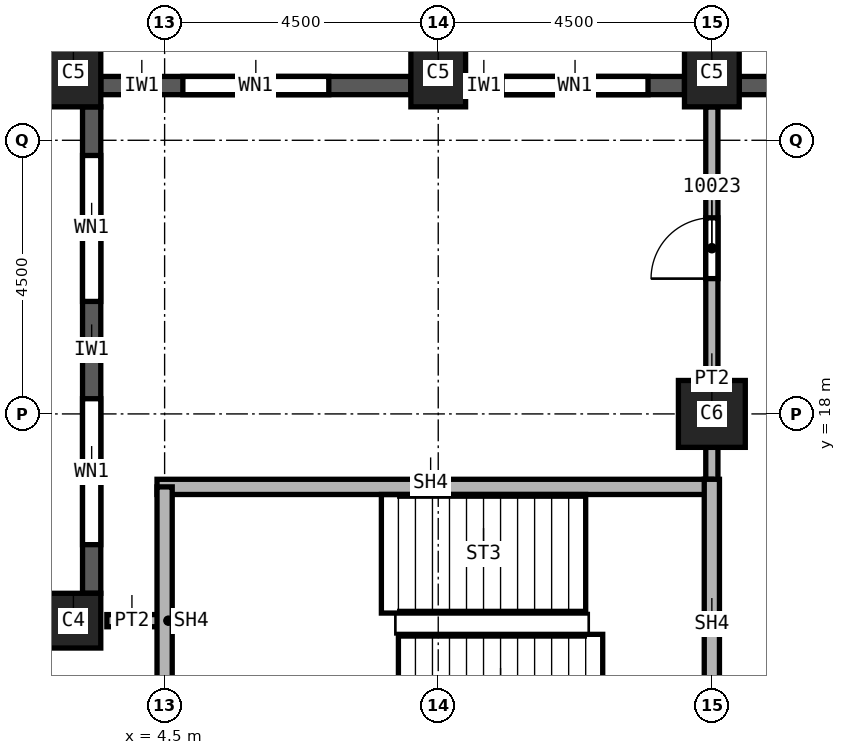
"""IFC4 building model, lengths in metres.
Left out: names, types, materials, properties, quantities, classifications, styles, units other than length and angle.
Written with IfcOpenShell. Run it as: python <this file> out.ifc"""

import sys

from ifc_helpers import new_model, si_unit, direction, frame, frame_2d, origin, origin_2d, place, context, subcontext, project, spatial, rectangle, extrude, element, fill, save


model = new_model("IFC4")
c1 = context("Model", 3, precision=1e-05, world=origin(), true_north=direction((0.0, 1.0)))
c2 = subcontext(c1, "Body", "Model", "MODEL_VIEW")
j1 = project(units=[si_unit("LENGTHUNIT", "METRE"), si_unit("PLANEANGLEUNIT", "RADIAN")], contexts=[c1])
p1 = place(None, origin())
s1 = spatial("IfcSite", under=j1, at=p1, CompositionType="ELEMENT")
p2 = place(p1, origin())
s2 = spatial("IfcBuilding", under=s1, at=p2, CompositionType="ELEMENT")
p3 = place(p2, frame((0.0, 0.0, 174.0)))
s3 = spatial("IfcBuildingStorey", under=s2, at=p3, CompositionType="ELEMENT", Elevation=174.0)
p4 = place(p3, frame((13.5, 18.0, 0.0), z_axis=(0.0, 0.0, 1.0), x_axis=(1.0, 0.0, 0.0)))
e1 = element("IfcColumn", 1, at=p4, inside=s3, PredefinedType="COLUMN", context=c2, shape_type="SweptSolid", body=[
    extrude(rectangle(XDim=1.1, YDim=1.1, at=origin_2d()), origin(), (0.0, 0.0, 1.0), 3.59),
])
for number, where, z_axis, x_axis in (
    (2, (3.0, 23.6, 0.0), (0.0, 0.0, 1.0), (1.0, 0.0, 0.0)),
    (3, (9.0, 23.6, 0.0), (0.0, 0.0, 1.0), (1.0, 0.0, 0.0)),
    (4, (13.5, 23.6, 0.0), (0.0, 0.0, 1.0), (1.0, 0.0, 0.0)),
):
    element("IfcColumn", number, at=place(p3, frame(where, z_axis=z_axis, x_axis=x_axis)), inside=s3, PredefinedType="COLUMN", context=c2, shape_type="SweptSolid", body=[
        extrude(rectangle(XDim=0.9, YDim=1.1, at=origin_2d()), origin(), (0.0, 0.0, 1.0), 3.59),
    ])
p5 = place(p3, frame((3.0, 14.6, 0.0), z_axis=(0.0, 0.0, 1.0), x_axis=(1.0, 0.0, 0.0)))
e5 = element("IfcColumn", 5, at=p5, inside=s3, PredefinedType="COLUMN", context=c2, shape_type="SweptSolid", body=[
    extrude(rectangle(XDim=0.9, YDim=0.9, at=origin_2d()), origin(), (0.0, 0.0, 1.0), 3.59),
])
p6 = place(p3, frame((17.55, 23.4, 0.0), z_axis=(0.0, 0.0, 1.0), x_axis=(-1.0, 0.0, 0.0)))
e6 = element("IfcWall", 6, at=p6, inside=s3, PredefinedType="SOLIDWALL", context=c2, shape_type="SweptSolid", body=[
    extrude(rectangle(XDim=3.6, YDim=0.3, at=frame_2d((1.8, 0.0))), origin(), (0.0, 0.0, 1.0), 2.99),
])
p7 = place(p6, frame((0.775, 0.0, 0.8)))
e7 = element("IfcOpeningElement", 7, at=p7, cuts=e6, PredefinedType="OPENING", context=c2, shape_type="SweptSolid", body=[
    extrude(rectangle(XDim=1.0, YDim=1.95, at=frame_2d((0.5, 0.975))), frame((0.0, 0.15, 0.0), z_axis=(0.0, -1.0, 0.0), x_axis=(1.0, 0.0, 0.0)), (0.0, 0.0, 1.0), 0.3),
])
p8 = place(p6, frame((2.375, 0.0, 0.8)))
e8 = element("IfcOpeningElement", 8, at=p8, cuts=e6, PredefinedType="OPENING", context=c2, shape_type="SweptSolid", body=[
    extrude(rectangle(XDim=0.6, YDim=1.95, at=frame_2d((0.3, 0.975))), frame((0.0, 0.15, 0.0), z_axis=(0.0, -1.0, 0.0), x_axis=(1.0, 0.0, 0.0)), (0.0, 0.0, 1.0), 0.3),
])
p9 = place(p3, frame((13.05, 23.4, 0.0), z_axis=(0.0, 0.0, 1.0), x_axis=(-1.0, 0.0, 0.0)))
e9 = element("IfcWall", 9, at=p9, inside=s3, PredefinedType="SOLIDWALL", context=c2, shape_type="SweptSolid", body=[
    extrude(rectangle(XDim=3.6, YDim=0.3, at=frame_2d((1.8, 0.0))), origin(), (0.0, 0.0, 1.0), 2.99),
])
p10 = place(p9, frame((0.6, 0.0, 0.8)))
e10 = element("IfcOpeningElement", 10, at=p10, cuts=e9, PredefinedType="OPENING", context=c2, shape_type="SweptSolid", body=[
    extrude(rectangle(XDim=2.4, YDim=1.95, at=frame_2d((1.2, 0.975))), frame((0.0, 0.15, 0.0), z_axis=(0.0, -1.0, 0.0), x_axis=(1.0, 0.0, 0.0)), (0.0, 0.0, 1.0), 0.3),
])
p11 = place(p3, frame((8.55, 23.4, 0.0), z_axis=(0.0, 0.0, 1.0), x_axis=(-1.0, 0.0, 0.0)))
e11 = element("IfcWall", 11, at=p11, inside=s3, PredefinedType="SOLIDWALL", context=c2, shape_type="SweptSolid", body=[
    extrude(rectangle(XDim=5.1, YDim=0.3, at=frame_2d((2.55, 0.0))), origin(), (0.0, 0.0, 1.0), 2.99),
])
p12 = place(p11, frame((1.35, 0.0, 0.8)))
e12 = element("IfcOpeningElement", 12, at=p12, cuts=e11, PredefinedType="OPENING", context=c2, shape_type="SweptSolid", body=[
    extrude(rectangle(XDim=2.4, YDim=1.95, at=frame_2d((1.2, 0.975))), frame((0.0, 0.15, 0.0), z_axis=(0.0, -1.0, 0.0), x_axis=(1.0, 0.0, 0.0)), (0.0, 0.0, 1.0), 0.3),
])
p13 = place(p3, frame((3.3, 23.05, 0.0), z_axis=(0.0, 0.0, 1.0), x_axis=(0.0, -1.0, 0.0)))
e13 = element("IfcWall", 13, at=p13, inside=s3, PredefinedType="SOLIDWALL", context=c2, shape_type="SweptSolid", body=[
    extrude(rectangle(XDim=8.0, YDim=0.3, at=frame_2d((4.0, 0.0))), origin(), (0.0, 0.0, 1.0), 2.99),
])
p14 = place(p13, frame((0.8, 0.0, 0.8)))
e14 = element("IfcOpeningElement", 14, at=p14, cuts=e13, PredefinedType="OPENING", context=c2, shape_type="SweptSolid", body=[
    extrude(rectangle(XDim=2.4, YDim=1.95, at=frame_2d((1.2, 0.975))), frame((0.0, 0.15, 0.0), z_axis=(0.0, -1.0, 0.0), x_axis=(1.0, 0.0, 0.0)), (0.0, 0.0, 1.0), 0.3),
])
p15 = place(p13, frame((4.8, 0.0, 0.8)))
e15 = element("IfcOpeningElement", 15, at=p15, cuts=e13, PredefinedType="OPENING", context=c2, shape_type="SweptSolid", body=[
    extrude(rectangle(XDim=2.4, YDim=1.95, at=frame_2d((1.2, 0.975))), frame((0.0, 0.15, 0.0), z_axis=(0.0, -1.0, 0.0), x_axis=(1.0, 0.0, 0.0)), (0.0, 0.0, 1.0), 0.3),
])
p16 = place(p3, frame((3.55, 14.6, 0.0), z_axis=(0.0, 0.0, 1.0), x_axis=(1.0, 0.0, 0.0)))
e16 = element("IfcWall", 16, at=p16, inside=s3, PredefinedType="PARTITIONING", context=c2, shape_type="SweptSolid", body=[
    extrude(rectangle(XDim=0.95, YDim=0.2, at=frame_2d((0.475, 0.0))), origin(), (0.0, 0.0, 1.0), 3.59),
])
p17 = place(p3, frame((13.5, 16.675, 0.0), z_axis=(0.0, 0.0, 1.0), x_axis=(0.0, 1.0, 0.0)))
e17 = element("IfcWall", 17, at=p17, inside=s3, PredefinedType="PARTITIONING", context=c2, shape_type="SweptSolid", body=[
    extrude(rectangle(XDim=6.375, YDim=0.2, at=frame_2d((3.188, 0.0))), origin(), (0.0, 0.0, 1.0), 3.59),
])
p18 = place(p17, frame((3.55, 0.0, 0.0)))
e18 = element("IfcOpeningElement", 18, at=p18, cuts=e17, PredefinedType="OPENING", context=c2, shape_type="SweptSolid", body=[
    extrude(rectangle(XDim=1.0, YDim=2.1, at=frame_2d((0.5, 1.05))), frame((0.0, 0.1, 0.0), z_axis=(0.0, -1.0, 0.0), x_axis=(1.0, 0.0, 0.0)), (0.0, 0.0, 1.0), 0.2),
])
p19 = place(p3, frame((4.375, 16.8, 0.0), z_axis=(0.0, 0.0, 1.0), x_axis=(1.0, 0.0, 0.0)))
e19 = element("IfcWall", 19, at=p19, inside=s3, PredefinedType="SOLIDWALL", context=c2, shape_type="SweptSolid", body=[
    extrude(rectangle(XDim=9.125, YDim=0.25, at=frame_2d((4.562, 0.0))), origin(), (0.0, 0.0, 1.0), 3.59),
])
p20 = place(p3, frame((4.5, 12.3, 0.0), z_axis=(0.0, 0.0, 1.0), x_axis=(0.0, 1.0, 0.0)))
e20 = element("IfcWall", 20, at=p20, inside=s3, PredefinedType="SOLIDWALL", context=c2, shape_type="SweptSolid", body=[
    extrude(rectangle(XDim=4.5, YDim=0.25, at=frame_2d((2.25, 0.0))), origin(), (0.0, 0.0, 1.0), 3.59),
])
p21 = place(p3, frame((13.5, 12.175, 0.0), z_axis=(0.0, 0.0, 1.0), x_axis=(0.0, 1.0, 0.0)))
e21 = element("IfcWall", 21, at=p21, inside=s3, PredefinedType="SOLIDWALL", context=c2, shape_type="SweptSolid", body=[
    extrude(rectangle(XDim=4.75, YDim=0.25, at=frame_2d((2.375, 0.0))), origin(), (0.0, 0.0, 1.0), 3.59),
])
p22 = place(p10, origin())
e22 = element("IfcWindow", 22, at=p22, inside=s3, PartitioningType="SINGLE_PANEL", PredefinedType="WINDOW", context=c2, shape_type="SweptSolid", body=[
    extrude(rectangle(XDim=2.4, YDim=1.95, at=frame_2d((1.2, 0.975))), frame((0.0, 0.03, 0.0), z_axis=(0.0, -1.0, 0.0), x_axis=(1.0, 0.0, 0.0)), (0.0, 0.0, 1.0), 0.06),
])
fill(e10, e22)
p23 = place(p12, origin())
e23 = element("IfcWindow", 23, at=p23, inside=s3, PartitioningType="SINGLE_PANEL", PredefinedType="WINDOW", context=c2, shape_type="SweptSolid", body=[
    extrude(rectangle(XDim=2.4, YDim=1.95, at=frame_2d((1.2, 0.975))), frame((0.0, 0.03, 0.0), z_axis=(0.0, -1.0, 0.0), x_axis=(1.0, 0.0, 0.0)), (0.0, 0.0, 1.0), 0.06),
])
fill(e12, e23)
p24 = place(p14, origin())
e24 = element("IfcWindow", 24, at=p24, inside=s3, PartitioningType="SINGLE_PANEL", PredefinedType="WINDOW", context=c2, shape_type="SweptSolid", body=[
    extrude(rectangle(XDim=2.4, YDim=1.95, at=frame_2d((1.2, 0.975))), frame((0.0, 0.03, 0.0), z_axis=(0.0, -1.0, 0.0), x_axis=(1.0, 0.0, 0.0)), (0.0, 0.0, 1.0), 0.06),
])
fill(e14, e24)
p25 = place(p15, origin())
e25 = element("IfcWindow", 25, at=p25, inside=s3, PartitioningType="SINGLE_PANEL", PredefinedType="WINDOW", context=c2, shape_type="SweptSolid", body=[
    extrude(rectangle(XDim=2.4, YDim=1.95, at=frame_2d((1.2, 0.975))), frame((0.0, 0.03, 0.0), z_axis=(0.0, -1.0, 0.0), x_axis=(1.0, 0.0, 0.0)), (0.0, 0.0, 1.0), 0.06),
])
fill(e15, e25)
p26 = place(p18, origin())
e26 = element("IfcDoor", 26, at=p26, inside=s3, OperationType="SINGLE_SWING_RIGHT", PredefinedType="DOOR", context=c2, shape_type="SweptSolid", body=[
    extrude(rectangle(XDim=1.0, YDim=2.1, at=frame_2d((0.5, 1.05))), frame((0.0, 0.025, 0.0), z_axis=(0.0, -1.0, 0.0), x_axis=(1.0, 0.0, 0.0)), (0.0, 0.0, 1.0), 0.05),
])
fill(e18, e26)
save(model, sys.argv[1])
